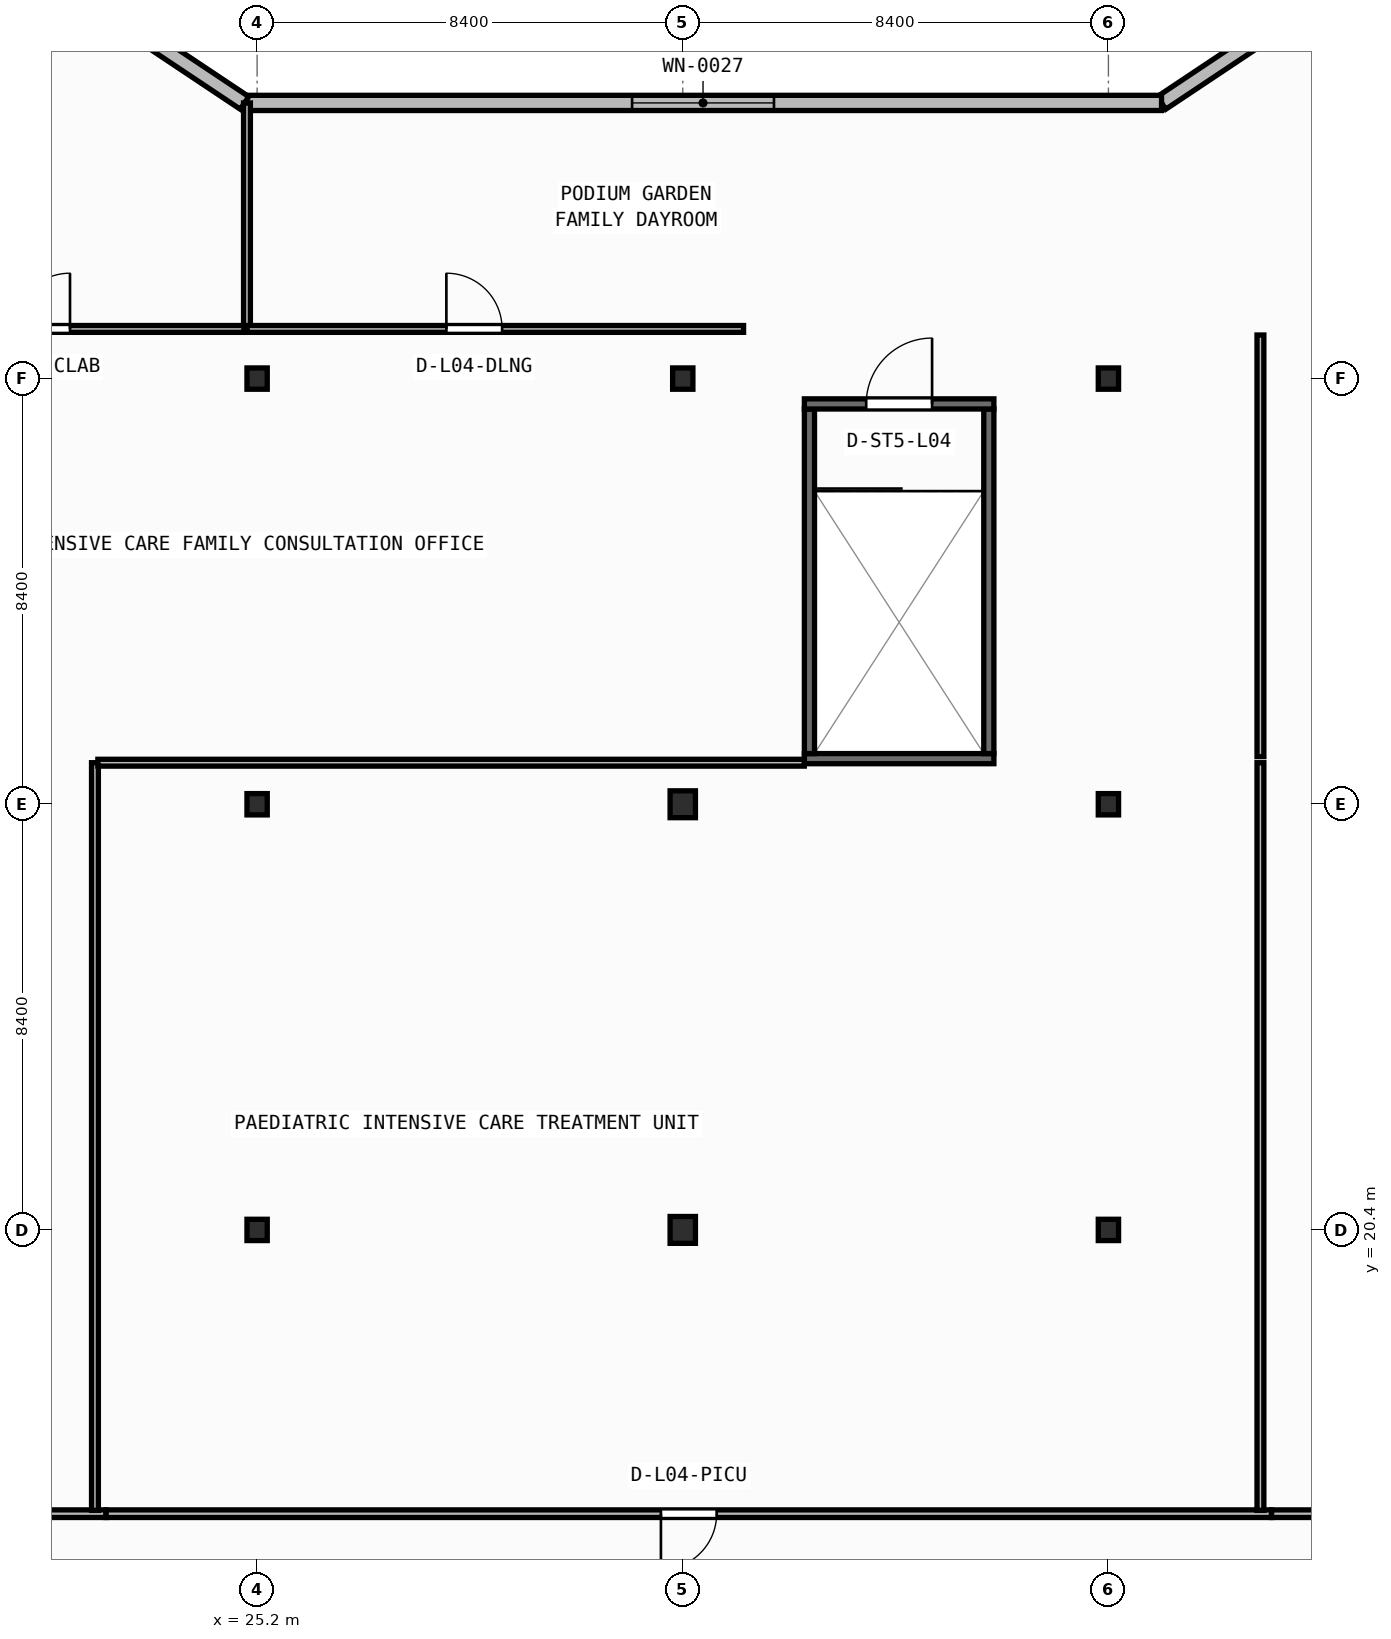
"""IFC4 building model, lengths in metres.
Left out: names, types, materials, properties, quantities, classifications, styles, units other than length and angle.
Written with IfcOpenShell. Run it as: python <this file> out.ifc"""

import sys

from ifc_helpers import new_model, si_unit, direction, frame, frame_2d, origin, origin_2d, place, context, subcontext, project, spatial, rectangle, i_section, extrude, element, fill, save


model = new_model("IFC4")
c1 = context("Model", 3, precision=1e-05, world=origin(), true_north=direction((0.0, 1.0)))
c2 = subcontext(c1, "Body", "Model", "MODEL_VIEW")
j1 = project(units=[si_unit("LENGTHUNIT", "METRE"), si_unit("PLANEANGLEUNIT", "RADIAN")], contexts=[c1])
p1 = place(None, origin())
s1 = spatial("IfcSite", under=j1, at=p1, CompositionType="ELEMENT")
p2 = place(p1, origin())
s2 = spatial("IfcBuilding", under=s1, at=p2, CompositionType="ELEMENT")
p3 = place(p2, frame((0.0, 0.0, 18.0)))
s3 = spatial("IfcBuildingStorey", under=s2, at=p3, CompositionType="ELEMENT", Elevation=18.0)
p4 = place(p3, frame((25.2, 20.4, 0.0), z_axis=(0.0, 0.0, 1.0), x_axis=(1.0, 0.0, 0.0)))
e1 = element("IfcColumn", 1, at=p4, inside=s3, PredefinedType="COLUMN", context=c2, shape_type="SweptSolid", body=[
    extrude(i_section(OverallWidth=0.4, OverallDepth=0.42, WebThickness=0.025, FlangeThickness=0.04, at=origin_2d()), origin(), (0.0, 0.0, 1.0), 4.5),
])
p5 = place(p3, frame((33.6, 20.4, 0.0), z_axis=(0.0, 0.0, 1.0), x_axis=(1.0, 0.0, 0.0)))
e2 = element("IfcColumn", 2, at=p5, inside=s3, PredefinedType="COLUMN", context=c2, shape_type="SweptSolid", body=[
    extrude(i_section(OverallWidth=0.5, OverallDepth=0.53, WebThickness=0.028, FlangeThickness=0.045, at=origin_2d()), origin(), (0.0, 0.0, 1.0), 4.5),
])
for number, where, z_axis, x_axis in (
    (3, (42.0, 20.4, 0.0), (0.0, 0.0, 1.0), (1.0, 0.0, 0.0)),
    (4, (25.2, 28.8, 0.0), (0.0, 0.0, 1.0), (1.0, 0.0, 0.0)),
):
    element("IfcColumn", number, at=place(p3, frame(where, z_axis=z_axis, x_axis=x_axis)), inside=s3, PredefinedType="COLUMN", context=c2, shape_type="SweptSolid", body=[
        extrude(i_section(OverallWidth=0.4, OverallDepth=0.42, WebThickness=0.025, FlangeThickness=0.04, at=origin_2d()), origin(), (0.0, 0.0, 1.0), 4.5),
    ])
p6 = place(p3, frame((33.6, 28.8, 0.0), z_axis=(0.0, 0.0, 1.0), x_axis=(1.0, 0.0, 0.0)))
e5 = element("IfcColumn", 5, at=p6, inside=s3, PredefinedType="COLUMN", context=c2, shape_type="SweptSolid", body=[
    extrude(i_section(OverallWidth=0.5, OverallDepth=0.53, WebThickness=0.028, FlangeThickness=0.045, at=origin_2d()), origin(), (0.0, 0.0, 1.0), 4.5),
])
for number, where, z_axis, x_axis in (
    (6, (42.0, 28.8, 0.0), (0.0, 0.0, 1.0), (1.0, 0.0, 0.0)),
    (7, (25.2, 37.2, 0.0), (0.0, 0.0, 1.0), (1.0, 0.0, 0.0)),
    (8, (33.6, 37.2, 0.0), (0.0, 0.0, 1.0), (1.0, 0.0, 0.0)),
    (9, (42.0, 37.2, 0.0), (0.0, 0.0, 1.0), (1.0, 0.0, 0.0)),
):
    element("IfcColumn", number, at=place(p3, frame(where, z_axis=z_axis, x_axis=x_axis)), inside=s3, PredefinedType="COLUMN", context=c2, shape_type="SweptSolid", body=[
        extrude(i_section(OverallWidth=0.4, OverallDepth=0.42, WebThickness=0.025, FlangeThickness=0.04, at=origin_2d()), origin(), (0.0, 0.0, 1.0), 4.5),
    ])
p7 = place(p3, frame((49.048, 46.64, 0.0), z_axis=(0.0, 0.0, 1.0), x_axis=(-0.832050294338, -0.554700196225, 0.0)))
e10 = element("IfcWall", 10, at=p7, inside=s3, PredefinedType="STANDARD", context=c2, shape_type="SweptSolid", body=[
    extrude(rectangle(XDim=7.211, YDim=0.3, at=frame_2d((3.605, 0.0))), origin(), (0.0, 0.0, 1.0), 4.08),
])
p8 = place(p7, frame((2.206, 0.0, 0.85)))
e11 = element("IfcOpeningElement", 11, at=p8, cuts=e10, PredefinedType="OPENING", context=c2, shape_type="SweptSolid", body=[
    extrude(rectangle(XDim=2.8, YDim=2.1, at=frame_2d((1.4, 1.05))), frame((0.0, 0.16, 0.0), z_axis=(0.0, -1.0, 0.0), x_axis=(1.0, 0.0, 0.0)), (0.0, 0.0, 1.0), 0.32),
])
p9 = place(p3, frame((43.048, 42.64, 0.0), z_axis=(0.0, 0.0, 1.0), x_axis=(-1.0, 0.0, 0.0)))
e12 = element("IfcWall", 12, at=p9, inside=s3, PredefinedType="STANDARD", context=c2, shape_type="SweptSolid", body=[
    extrude(rectangle(XDim=18.097, YDim=0.3, at=frame_2d((9.048, 0.0))), origin(), (0.0, 0.0, 1.0), 4.08),
])
p10 = place(p9, frame((7.648, 0.0, 0.85)))
e13 = element("IfcOpeningElement", 13, at=p10, cuts=e12, PredefinedType="OPENING", context=c2, shape_type="SweptSolid", body=[
    extrude(rectangle(XDim=2.8, YDim=2.1, at=frame_2d((1.4, 1.05))), frame((0.0, 0.16, 0.0), z_axis=(0.0, -1.0, 0.0), x_axis=(1.0, 0.0, 0.0)), (0.0, 0.0, 1.0), 0.32),
])
p11 = place(p3, frame((24.952, 42.64, 0.0), z_axis=(0.0, 0.0, 1.0), x_axis=(-0.832050294338, 0.554700196225, 0.0)))
e14 = element("IfcWall", 14, at=p11, inside=s3, PredefinedType="STANDARD", context=c2, shape_type="SweptSolid", body=[
    extrude(rectangle(XDim=7.211, YDim=0.3, at=frame_2d((3.605, 0.0))), origin(), (0.0, 0.0, 1.0), 4.08),
])
p12 = place(p11, frame((2.206, 0.0, 0.85)))
e15 = element("IfcOpeningElement", 15, at=p12, cuts=e14, PredefinedType="OPENING", context=c2, shape_type="SweptSolid", body=[
    extrude(rectangle(XDim=2.8, YDim=2.1, at=frame_2d((1.4, 1.05))), frame((0.0, 0.16, 0.0), z_axis=(0.0, -1.0, 0.0), x_axis=(1.0, 0.0, 0.0)), (0.0, 0.0, 1.0), 0.32),
])
p13 = place(p3, frame((36.0, 29.7, 0.0), z_axis=(0.0, 0.0, 1.0), x_axis=(1.0, 0.0, 0.0)))
e16 = element("IfcWall", 16, at=p13, inside=s3, PredefinedType="SHEAR", context=c2, shape_type="SweptSolid", body=[
    extrude(rectangle(XDim=3.74, YDim=0.2, at=frame_2d((1.87, 0.0))), origin(), (0.0, 0.0, 1.0), 4.08),
])
for number, where, z_axis, x_axis in (
    (17, (36.1, 29.8, 0.0), (0.0, 0.0, 1.0), (0.0, 1.0, 0.0)),
    (18, (39.64, 29.8, 0.0), (0.0, 0.0, 1.0), (0.0, 1.0, 0.0)),
):
    element("IfcWall", number, at=place(p3, frame(where, z_axis=z_axis, x_axis=x_axis)), inside=s3, PredefinedType="SHEAR", context=c2, shape_type="SweptSolid", body=[
        extrude(rectangle(XDim=6.8, YDim=0.2, at=frame_2d((3.4, 0.0))), origin(), (0.0, 0.0, 1.0), 4.08),
    ])
p14 = place(p3, frame((36.0, 36.7, 0.0), z_axis=(0.0, 0.0, 1.0), x_axis=(1.0, 0.0, 0.0)))
e19 = element("IfcWall", 19, at=p14, inside=s3, PredefinedType="SHEAR", context=c2, shape_type="SweptSolid", body=[
    extrude(rectangle(XDim=3.74, YDim=0.2, at=frame_2d((1.87, 0.0))), origin(), (0.0, 0.0, 1.0), 4.08),
])
p15 = place(p14, frame((1.22, 0.0, 0.0)))
e20 = element("IfcOpeningElement", 20, at=p15, cuts=e19, PredefinedType="OPENING", context=c2, shape_type="SweptSolid", body=[
    extrude(rectangle(XDim=1.3, YDim=2.15, at=frame_2d((0.65, 1.075))), frame((0.0, 0.11, 0.0), z_axis=(0.0, -1.0, 0.0), x_axis=(1.0, 0.0, 0.0)), (0.0, 0.0, 1.0), 0.22),
])
p16 = place(p3, frame((22.218, 14.8, 0.0), z_axis=(0.0, 0.0, 1.0), x_axis=(-1.0, 0.0, 0.0)))
e21 = element("IfcWall", 21, at=p16, inside=s3, PredefinedType="PARTITIONING", context=c2, shape_type="SweptSolid", body=[
    extrude(rectangle(XDim=15.126, YDim=0.15, at=frame_2d((7.563, 0.0))), origin(), (0.0, 0.0, 1.0), 4.08),
])
p17 = place(p16, frame((7.013, 0.0, 0.0)))
e22 = element("IfcOpeningElement", 22, at=p17, cuts=e21, PredefinedType="OPENING", context=c2, shape_type="SweptSolid", body=[
    extrude(rectangle(XDim=1.1, YDim=2.1, at=frame_2d((0.55, 1.05))), frame((0.0, 0.085, 0.0), z_axis=(0.0, -1.0, 0.0), x_axis=(1.0, 0.0, 0.0)), (0.0, 0.0, 1.0), 0.17),
])
p18 = place(p3, frame((45.218, 14.8, 0.0), z_axis=(0.0, 0.0, 1.0), x_axis=(-1.0, 0.0, 0.0)))
e23 = element("IfcWall", 23, at=p18, inside=s3, PredefinedType="PARTITIONING", context=c2, shape_type="SweptSolid", body=[
    extrude(rectangle(XDim=22.998, YDim=0.15, at=frame_2d((11.499, 0.0))), origin(), (0.0, 0.0, 1.0), 4.08),
])
p19 = place(p18, frame((10.949, 0.0, 0.0)))
e24 = element("IfcOpeningElement", 24, at=p19, cuts=e23, PredefinedType="OPENING", context=c2, shape_type="SweptSolid", body=[
    extrude(rectangle(XDim=1.1, YDim=2.1, at=frame_2d((0.55, 1.05))), frame((0.0, 0.085, 0.0), z_axis=(0.0, -1.0, 0.0), x_axis=(1.0, 0.0, 0.0)), (0.0, 0.0, 1.0), 0.17),
])
p20 = place(p3, frame((70.168, 14.8, 0.0), z_axis=(0.0, 0.0, 1.0), x_axis=(-1.0, 0.0, 0.0)))
e25 = element("IfcWall", 25, at=p20, inside=s3, PredefinedType="PARTITIONING", context=c2, shape_type="SweptSolid", body=[
    extrude(rectangle(XDim=24.948, YDim=0.15, at=frame_2d((12.474, 0.0))), origin(), (0.0, 0.0, 1.0), 4.08),
])
p21 = place(p20, frame((11.924, 0.0, 0.0)))
e26 = element("IfcOpeningElement", 26, at=p21, cuts=e25, PredefinedType="OPENING", context=c2, shape_type="SweptSolid", body=[
    extrude(rectangle(XDim=1.1, YDim=2.1, at=frame_2d((0.55, 1.05))), frame((0.0, 0.085, 0.0), z_axis=(0.0, -1.0, 0.0), x_axis=(1.0, 0.0, 0.0)), (0.0, 0.0, 1.0), 0.17),
])
p22 = place(p3, frame((22.0, 14.865, 0.0), z_axis=(0.0, 0.0, 1.0), x_axis=(0.0, 1.0, 0.0)))
e27 = element("IfcWall", 27, at=p22, inside=s3, PredefinedType="PARTITIONING", context=c2, shape_type="SweptSolid", body=[
    extrude(rectangle(XDim=14.755, YDim=0.135, at=frame_2d((7.377, 0.0))), origin(), (0.0, 0.0, 1.0), 4.08),
])
p23 = place(p3, frame((35.998, 29.62, 0.0), z_axis=(0.0, 0.0, 1.0), x_axis=(-1.0, 0.0, 0.0)))
e28 = element("IfcWall", 28, at=p23, inside=s3, PredefinedType="PARTITIONING", context=c2, shape_type="SweptSolid", body=[
    extrude(rectangle(XDim=13.94, YDim=0.135, at=frame_2d((6.97, 0.0))), origin(), (0.0, 0.0, 1.0), 4.08),
])
p24 = place(p3, frame((45.0, 14.865, 0.0), z_axis=(0.0, 0.0, 1.0), x_axis=(0.0, 1.0, 0.0)))
e29 = element("IfcWall", 29, at=p24, inside=s3, PredefinedType="PARTITIONING", context=c2, shape_type="SweptSolid", body=[
    extrude(rectangle(XDim=14.755, YDim=0.135, at=frame_2d((7.377, 0.0))), origin(), (0.0, 0.0, 1.0), 4.08),
])
p25 = place(p3, frame((25.0, 42.64, 0.0), z_axis=(0.0, 0.0, 1.0), x_axis=(0.0, -1.0, 0.0)))
e30 = element("IfcWall", 30, at=p25, inside=s3, PredefinedType="PARTITIONING", context=c2, shape_type="SweptSolid", body=[
    extrude(rectangle(XDim=4.46, YDim=0.135, at=frame_2d((2.23, 0.0))), origin(), (0.0, 0.0, 1.0), 4.08),
])
p26 = place(p3, frame((25.0, 38.18, 0.0), z_axis=(0.0, 0.0, 1.0), x_axis=(1.0, 0.0, 0.0)))
e31 = element("IfcWall", 31, at=p26, inside=s3, PredefinedType="PARTITIONING", context=c2, shape_type="SweptSolid", body=[
    extrude(rectangle(XDim=9.8, YDim=0.135, at=frame_2d((4.9, 0.0))), origin(), (0.0, 0.0, 1.0), 4.08),
])
p27 = place(p26, frame((3.935, 0.0, 0.0)))
e32 = element("IfcOpeningElement", 32, at=p27, cuts=e31, PredefinedType="OPENING", context=c2, shape_type="SweptSolid", body=[
    extrude(rectangle(XDim=1.1, YDim=2.1, at=frame_2d((0.55, 1.05))), frame((0.0, 0.077, 0.0), z_axis=(0.0, -1.0, 0.0), x_axis=(1.0, 0.0, 0.0)), (0.0, 0.0, 1.0), 0.155),
])
p28 = place(p3, frame((14.2, 38.18, 0.0), z_axis=(0.0, 0.0, 1.0), x_axis=(1.0, 0.0, 0.0)))
e33 = element("IfcWall", 33, at=p28, inside=s3, PredefinedType="PARTITIONING", context=c2, shape_type="SweptSolid", body=[
    extrude(rectangle(XDim=10.742, YDim=0.135, at=frame_2d((5.371, 0.0))), origin(), (0.0, 0.0, 1.0), 4.08),
])
p29 = place(p28, frame((6.208, 0.0, 0.0)))
e34 = element("IfcOpeningElement", 34, at=p29, cuts=e33, PredefinedType="OPENING", context=c2, shape_type="SweptSolid", body=[
    extrude(rectangle(XDim=1.1, YDim=2.1, at=frame_2d((0.55, 1.05))), frame((0.0, 0.077, 0.0), z_axis=(0.0, -1.0, 0.0), x_axis=(1.0, 0.0, 0.0)), (0.0, 0.0, 1.0), 0.155),
])
p30 = place(p3, frame((45.0, 29.74, 0.0), z_axis=(0.0, 0.0, 1.0), x_axis=(0.0, 1.0, 0.0)))
e35 = element("IfcWall", 35, at=p30, inside=s3, PredefinedType="PARTITIONING", context=c2, shape_type="SweptSolid", body=[
    extrude(rectangle(XDim=8.32, YDim=0.135, at=frame_2d((4.16, 0.0))), origin(), (0.0, 0.0, 1.0), 4.08),
])
p31 = place(p10, origin())
e36 = element("IfcWindow", 36, at=p31, inside=s3, PartitioningType="SINGLE_PANEL", PredefinedType="WINDOW", context=c2, shape_type="SweptSolid", body=[
    extrude(rectangle(XDim=2.8, YDim=2.1, at=frame_2d((1.4, 1.05))), frame((0.0, 0.03, 0.0), z_axis=(0.0, -1.0, 0.0), x_axis=(1.0, 0.0, 0.0)), (0.0, 0.0, 1.0), 0.06),
])
fill(e13, e36)
p32 = place(p15, origin())
e37 = element("IfcDoor", 37, at=p32, inside=s3, OperationType="SINGLE_SWING_RIGHT", PredefinedType="DOOR", context=c2, shape_type="SweptSolid", body=[
    extrude(rectangle(XDim=1.3, YDim=2.15, at=frame_2d((0.65, 1.075))), frame((0.0, 0.025, 0.0), z_axis=(0.0, -1.0, 0.0), x_axis=(1.0, 0.0, 0.0)), (0.0, 0.0, 1.0), 0.05),
])
fill(e20, e37)
p33 = place(p19, origin())
e38 = element("IfcDoor", 38, at=p33, inside=s3, OperationType="SINGLE_SWING_RIGHT", PredefinedType="DOOR", context=c2, shape_type="SweptSolid", body=[
    extrude(rectangle(XDim=1.1, YDim=2.1, at=frame_2d((0.55, 1.05))), frame((0.0, 0.025, 0.0), z_axis=(0.0, -1.0, 0.0), x_axis=(1.0, 0.0, 0.0)), (0.0, 0.0, 1.0), 0.05),
])
fill(e24, e38)
p34 = place(p27, origin())
e39 = element("IfcDoor", 39, at=p34, inside=s3, OperationType="SINGLE_SWING_LEFT", PredefinedType="DOOR", context=c2, shape_type="SweptSolid", body=[
    extrude(rectangle(XDim=1.1, YDim=2.1, at=frame_2d((0.55, 1.05))), frame((0.0, 0.025, 0.0), z_axis=(0.0, -1.0, 0.0), x_axis=(1.0, 0.0, 0.0)), (0.0, 0.0, 1.0), 0.05),
])
fill(e32, e39)
p35 = place(p29, origin())
e40 = element("IfcDoor", 40, at=p35, inside=s3, OperationType="SINGLE_SWING_RIGHT", PredefinedType="DOOR", context=c2, shape_type="SweptSolid", body=[
    extrude(rectangle(XDim=1.1, YDim=2.1, at=frame_2d((0.55, 1.05))), frame((0.0, 0.025, 0.0), z_axis=(0.0, -1.0, 0.0), x_axis=(1.0, 0.0, 0.0)), (0.0, 0.0, 1.0), 0.05),
])
fill(e34, e40)
save(model, sys.argv[1])
